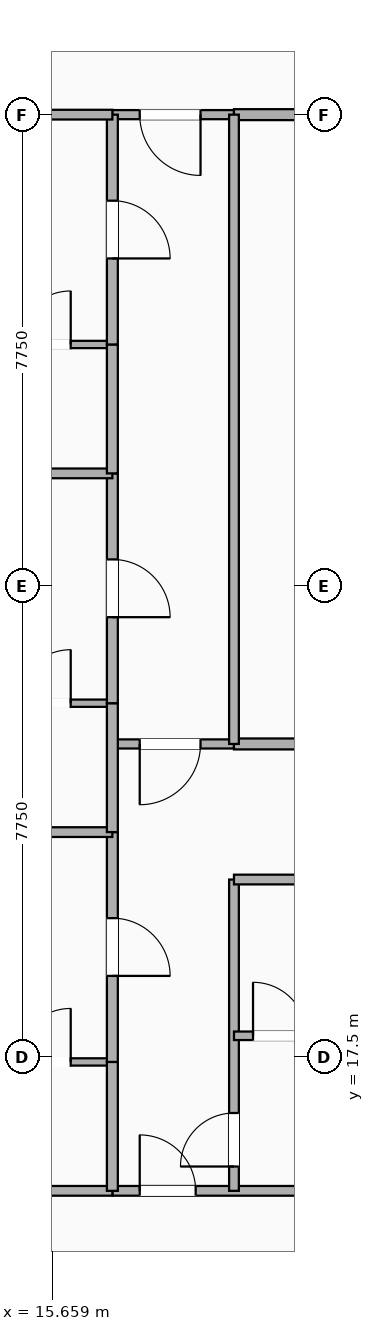
"""IFC4 building model, lengths in metres.
Left out: names, types, materials, properties, quantities, classifications, styles, units other than length and angle.
Written with IfcOpenShell. Run it as: python <this file> out.ifc"""

import sys

from ifc_helpers import new_model, si_unit, direction, frame, frame_2d, origin, place, context, subcontext, project, spatial, rectangle, extrude, element, fill, save


model = new_model("IFC4")
c1 = context("Model", 3, precision=1e-05, world=origin(), true_north=direction((0.0, 1.0)))
c2 = subcontext(c1, "Body", "Model", "MODEL_VIEW")
j1 = project(units=[si_unit("LENGTHUNIT", "METRE"), si_unit("PLANEANGLEUNIT", "RADIAN")], contexts=[c1])
p1 = place(None, origin())
s1 = spatial("IfcSite", under=j1, at=p1, CompositionType="ELEMENT")
p2 = place(p1, origin())
s2 = spatial("IfcBuilding", under=s1, at=p2, CompositionType="ELEMENT")
p3 = place(p2, frame((0.0, 0.0, 98.7)))
s3 = spatial("IfcBuildingStorey", under=s2, at=p3, CompositionType="ELEMENT", Elevation=98.7)
p4 = place(p3, frame((16.65, 15.3, 0.0), z_axis=(0.0, 0.0, 1.0), x_axis=(1.0, 0.0, 0.0)))
e1 = element("IfcWall", 1, at=p4, inside=s3, PredefinedType="PARTITIONING", context=c2, shape_type="SweptSolid", body=[
    extrude(rectangle(XDim=3.65, YDim=0.16, at=frame_2d((1.825, 0.0))), origin(), (0.0, 0.0, 1.0), 2.313),
])
p5 = place(p4, frame((1.37, 0.0, 0.0), z_axis=(0.0, 0.0, 1.0), x_axis=(-1.0, 0.0, 0.0)))
e2 = element("IfcOpeningElement", 2, at=p5, cuts=e1, PredefinedType="OPENING", context=c2, shape_type="SweptSolid", body=[
    extrude(rectangle(XDim=0.92, YDim=2.08, at=frame_2d((0.46, 1.04))), frame((0.0, 0.09, 0.0), z_axis=(0.0, -1.0, 0.0), x_axis=(1.0, 0.0, 0.0)), (0.0, 0.0, 1.0), 0.18),
])
p6 = place(p3, frame((18.65, 15.3, 0.0), z_axis=(0.0, 0.0, 1.0), x_axis=(0.0, 1.0, 0.0)))
e3 = element("IfcWall", 3, at=p6, inside=s3, PredefinedType="PARTITIONING", context=c2, shape_type="SweptSolid", body=[
    extrude(rectangle(XDim=5.12, YDim=0.16, at=frame_2d((2.56, 0.0))), origin(), (0.0, 0.0, 1.0), 2.313),
])
p7 = place(p6, frame((1.28, 0.0, 0.0), z_axis=(0.0, 0.0, 1.0), x_axis=(-1.0, 0.0, 0.0)))
e4 = element("IfcOpeningElement", 4, at=p7, cuts=e3, PredefinedType="OPENING", context=c2, shape_type="SweptSolid", body=[
    extrude(rectangle(XDim=0.88, YDim=2.08, at=frame_2d((0.44, 1.04))), frame((0.0, 0.09, 0.0), z_axis=(0.0, -1.0, 0.0), x_axis=(1.0, 0.0, 0.0)), (0.0, 0.0, 1.0), 0.18),
])
p8 = place(p3, frame((18.65, 20.42, 0.0), z_axis=(0.0, 0.0, 1.0), x_axis=(1.0, 0.0, 0.0)))
e5 = element("IfcWall", 5, at=p8, inside=s3, PredefinedType="PARTITIONING", context=c2, shape_type="SweptSolid", body=[
    extrude(rectangle(XDim=1.65, YDim=0.16, at=frame_2d((0.825, 0.0))), origin(), (0.0, 0.0, 1.0), 2.313),
])
p9 = place(p3, frame((16.65, 22.65, 0.0), z_axis=(0.0, 0.0, 1.0), x_axis=(1.0, 0.0, 0.0)))
e6 = element("IfcWall", 6, at=p9, inside=s3, PredefinedType="PARTITIONING", context=c2, shape_type="SweptSolid", body=[
    extrude(rectangle(XDim=2.0, YDim=0.15, at=frame_2d((1.0, 0.0))), origin(), (0.0, 0.0, 1.0), 3.24),
])
p10 = place(p9, frame((0.45, 0.0, 0.0)))
e7 = element("IfcOpeningElement", 7, at=p10, cuts=e6, PredefinedType="OPENING", context=c2, shape_type="SweptSolid", body=[
    extrude(rectangle(XDim=1.0, YDim=2.15, at=frame_2d((0.5, 1.075))), frame((0.0, 0.085, 0.0), z_axis=(0.0, -1.0, 0.0), x_axis=(1.0, 0.0, 0.0)), (0.0, 0.0, 1.0), 0.17),
])
p11 = place(p3, frame((16.65, 33.0, 0.0), z_axis=(0.0, 0.0, 1.0), x_axis=(1.0, 0.0, 0.0)))
e8 = element("IfcWall", 8, at=p11, inside=s3, PredefinedType="PARTITIONING", context=c2, shape_type="SweptSolid", body=[
    extrude(rectangle(XDim=2.0, YDim=0.15, at=frame_2d((1.0, 0.0))), origin(), (0.0, 0.0, 1.0), 2.313),
])
p12 = place(p11, frame((0.45, 0.0, 0.0)))
e9 = element("IfcOpeningElement", 9, at=p12, cuts=e8, PredefinedType="OPENING", context=c2, shape_type="SweptSolid", body=[
    extrude(rectangle(XDim=1.0, YDim=2.15, at=frame_2d((0.5, 1.075))), frame((0.0, 0.085, 0.0), z_axis=(0.0, -1.0, 0.0), x_axis=(1.0, 0.0, 0.0)), (0.0, 0.0, 1.0), 0.17),
])
p13 = place(p3, frame((18.65, 22.65, 0.0), z_axis=(0.0, 0.0, 1.0), x_axis=(1.0, 0.0, 0.0)))
e10 = element("IfcWall", 10, at=p13, inside=s3, PredefinedType="PARTITIONING", context=c2, shape_type="SweptSolid", body=[
    extrude(rectangle(XDim=14.75, YDim=0.18, at=frame_2d((7.375, 0.0))), origin(), (0.0, 0.0, 1.0), 2.313),
])
p14 = place(p13, frame((6.9, 0.0, 0.0)))
e11 = element("IfcOpeningElement", 11, at=p14, cuts=e10, PredefinedType="OPENING", context=c2, shape_type="SweptSolid", body=[
    extrude(rectangle(XDim=0.95, YDim=2.15, at=frame_2d((0.475, 1.075))), frame((0.0, 0.1, 0.0), z_axis=(0.0, -1.0, 0.0), x_axis=(1.0, 0.0, 0.0)), (0.0, 0.0, 1.0), 0.2),
])
p15 = place(p3, frame((18.65, 33.0, 0.0), z_axis=(0.0, 0.0, 1.0), x_axis=(1.0, 0.0, 0.0)))
e12 = element("IfcWall", 12, at=p15, inside=s3, PredefinedType="PARTITIONING", context=c2, shape_type="SweptSolid", body=[
    extrude(rectangle(XDim=14.75, YDim=0.18, at=frame_2d((7.375, 0.0))), origin(), (0.0, 0.0, 1.0), 2.313),
])
p16 = place(p3, frame((18.65, 22.65, 0.0), z_axis=(0.0, 0.0, 1.0), x_axis=(0.0, 1.0, 0.0)))
e13 = element("IfcWall", 13, at=p16, inside=s3, PredefinedType="PARTITIONING", context=c2, shape_type="SweptSolid", body=[
    extrude(rectangle(XDim=10.35, YDim=0.16, at=frame_2d((5.175, 0.0))), origin(), (0.0, 0.0, 1.0), 2.313),
])
p17 = place(p3, frame((11.47, 15.3, 0.0), z_axis=(0.0, 0.0, 1.0), x_axis=(1.0, 0.0, 0.0)))
e14 = element("IfcWall", 14, at=p17, inside=s3, PredefinedType="PARTITIONING", context=c2, shape_type="SweptSolid", body=[
    extrude(rectangle(XDim=5.18, YDim=0.16, at=frame_2d((2.59, 0.0))), origin(), (0.0, 0.0, 1.0), 2.603),
])
p18 = place(p3, frame((14.4, 17.42, 0.0), z_axis=(0.0, 0.0, 1.0), x_axis=(1.0, 0.0, 0.0)))
e15 = element("IfcWall", 15, at=p18, inside=s3, PredefinedType="PARTITIONING", context=c2, shape_type="SweptSolid", body=[
    extrude(rectangle(XDim=2.25, YDim=0.12, at=frame_2d((1.125, 0.0))), origin(), (0.0, 0.0, 1.0), 3.24),
])
p19 = place(p18, frame((1.565, 0.0, 0.0), z_axis=(0.0, 0.0, 1.0), x_axis=(-1.0, 0.0, 0.0)))
e16 = element("IfcOpeningElement", 16, at=p19, cuts=e15, PredefinedType="OPENING", context=c2, shape_type="SweptSolid", body=[
    extrude(rectangle(XDim=0.88, YDim=2.08, at=frame_2d((0.44, 1.04))), frame((0.0, 0.07, 0.0), z_axis=(0.0, -1.0, 0.0), x_axis=(1.0, 0.0, 0.0)), (0.0, 0.0, 1.0), 0.14),
])
p20 = place(p3, frame((16.65, 15.3, 0.0), z_axis=(0.0, 0.0, 1.0), x_axis=(0.0, 1.0, 0.0)))
e17 = element("IfcWall", 17, at=p20, inside=s3, PredefinedType="PARTITIONING", context=c2, shape_type="SweptSolid", body=[
    extrude(rectangle(XDim=2.12, YDim=0.18, at=frame_2d((1.06, 0.0))), origin(), (0.0, 0.0, 1.0), 2.922),
])
p21 = place(p3, frame((16.65, 17.42, 0.0), z_axis=(0.0, 0.0, 1.0), x_axis=(0.0, 1.0, 0.0)))
e18 = element("IfcWall", 18, at=p21, inside=s3, PredefinedType="PARTITIONING", context=c2, shape_type="SweptSolid", body=[
    extrude(rectangle(XDim=3.78, YDim=0.18, at=frame_2d((1.89, 0.0))), origin(), (0.0, 0.0, 1.0), 2.313),
])
p22 = place(p21, frame((1.415, 0.0, 0.0)))
e19 = element("IfcOpeningElement", 19, at=p22, cuts=e18, PredefinedType="OPENING", context=c2, shape_type="SweptSolid", body=[
    extrude(rectangle(XDim=0.95, YDim=2.15, at=frame_2d((0.475, 1.075))), frame((0.0, 0.1, 0.0), z_axis=(0.0, -1.0, 0.0), x_axis=(1.0, 0.0, 0.0)), (0.0, 0.0, 1.0), 0.2),
])
p23 = place(p3, frame((11.47, 21.2, 0.0), z_axis=(0.0, 0.0, 1.0), x_axis=(1.0, 0.0, 0.0)))
e20 = element("IfcWall", 20, at=p23, inside=s3, PredefinedType="PARTITIONING", context=c2, shape_type="SweptSolid", body=[
    extrude(rectangle(XDim=5.18, YDim=0.16, at=frame_2d((2.59, 0.0))), origin(), (0.0, 0.0, 1.0), 2.603),
])
p24 = place(p3, frame((14.4, 23.32, 0.0), z_axis=(0.0, 0.0, 1.0), x_axis=(1.0, 0.0, 0.0)))
e21 = element("IfcWall", 21, at=p24, inside=s3, PredefinedType="PARTITIONING", context=c2, shape_type="SweptSolid", body=[
    extrude(rectangle(XDim=2.25, YDim=0.12, at=frame_2d((1.125, 0.0))), origin(), (0.0, 0.0, 1.0), 3.24),
])
p25 = place(p24, frame((1.565, 0.0, 0.0), z_axis=(0.0, 0.0, 1.0), x_axis=(-1.0, 0.0, 0.0)))
e22 = element("IfcOpeningElement", 22, at=p25, cuts=e21, PredefinedType="OPENING", context=c2, shape_type="SweptSolid", body=[
    extrude(rectangle(XDim=0.88, YDim=2.08, at=frame_2d((0.44, 1.04))), frame((0.0, 0.07, 0.0), z_axis=(0.0, -1.0, 0.0), x_axis=(1.0, 0.0, 0.0)), (0.0, 0.0, 1.0), 0.14),
])
p26 = place(p3, frame((16.65, 21.2, 0.0), z_axis=(0.0, 0.0, 1.0), x_axis=(0.0, 1.0, 0.0)))
e23 = element("IfcWall", 23, at=p26, inside=s3, PredefinedType="PARTITIONING", context=c2, shape_type="SweptSolid", body=[
    extrude(rectangle(XDim=2.12, YDim=0.18, at=frame_2d((1.06, 0.0))), origin(), (0.0, 0.0, 1.0), 3.24),
])
p27 = place(p3, frame((16.65, 23.32, 0.0), z_axis=(0.0, 0.0, 1.0), x_axis=(0.0, 1.0, 0.0)))
e24 = element("IfcWall", 24, at=p27, inside=s3, PredefinedType="PARTITIONING", context=c2, shape_type="SweptSolid", body=[
    extrude(rectangle(XDim=3.78, YDim=0.18, at=frame_2d((1.89, 0.0))), origin(), (0.0, 0.0, 1.0), 2.818),
])
p28 = place(p27, frame((1.415, 0.0, 0.0)))
e25 = element("IfcOpeningElement", 25, at=p28, cuts=e24, PredefinedType="OPENING", context=c2, shape_type="SweptSolid", body=[
    extrude(rectangle(XDim=0.95, YDim=2.15, at=frame_2d((0.475, 1.075))), frame((0.0, 0.1, 0.0), z_axis=(0.0, -1.0, 0.0), x_axis=(1.0, 0.0, 0.0)), (0.0, 0.0, 1.0), 0.2),
])
p29 = place(p3, frame((11.47, 27.1, 0.0), z_axis=(0.0, 0.0, 1.0), x_axis=(1.0, 0.0, 0.0)))
e26 = element("IfcWall", 26, at=p29, inside=s3, PredefinedType="PARTITIONING", context=c2, shape_type="SweptSolid", body=[
    extrude(rectangle(XDim=5.18, YDim=0.16, at=frame_2d((2.59, 0.0))), origin(), (0.0, 0.0, 1.0), 2.603),
])
p30 = place(p3, frame((14.4, 29.22, 0.0), z_axis=(0.0, 0.0, 1.0), x_axis=(1.0, 0.0, 0.0)))
e27 = element("IfcWall", 27, at=p30, inside=s3, PredefinedType="PARTITIONING", context=c2, shape_type="SweptSolid", body=[
    extrude(rectangle(XDim=2.25, YDim=0.12, at=frame_2d((1.125, 0.0))), origin(), (0.0, 0.0, 1.0), 3.24),
])
p31 = place(p30, frame((1.565, 0.0, 0.0), z_axis=(0.0, 0.0, 1.0), x_axis=(-1.0, 0.0, 0.0)))
e28 = element("IfcOpeningElement", 28, at=p31, cuts=e27, PredefinedType="OPENING", context=c2, shape_type="SweptSolid", body=[
    extrude(rectangle(XDim=0.88, YDim=2.08, at=frame_2d((0.44, 1.04))), frame((0.0, 0.07, 0.0), z_axis=(0.0, -1.0, 0.0), x_axis=(1.0, 0.0, 0.0)), (0.0, 0.0, 1.0), 0.14),
])
p32 = place(p3, frame((16.65, 27.1, 0.0), z_axis=(0.0, 0.0, 1.0), x_axis=(0.0, 1.0, 0.0)))
e29 = element("IfcWall", 29, at=p32, inside=s3, PredefinedType="PARTITIONING", context=c2, shape_type="SweptSolid", body=[
    extrude(rectangle(XDim=2.12, YDim=0.18, at=frame_2d((1.06, 0.0))), origin(), (0.0, 0.0, 1.0), 2.818),
])
p33 = place(p3, frame((16.65, 29.22, 0.0), z_axis=(0.0, 0.0, 1.0), x_axis=(0.0, 1.0, 0.0)))
e30 = element("IfcWall", 30, at=p33, inside=s3, PredefinedType="PARTITIONING", context=c2, shape_type="SweptSolid", body=[
    extrude(rectangle(XDim=3.78, YDim=0.18, at=frame_2d((1.89, 0.0))), origin(), (0.0, 0.0, 1.0), 2.313),
])
p34 = place(p33, frame((1.415, 0.0, 0.0)))
e31 = element("IfcOpeningElement", 31, at=p34, cuts=e30, PredefinedType="OPENING", context=c2, shape_type="SweptSolid", body=[
    extrude(rectangle(XDim=0.95, YDim=2.15, at=frame_2d((0.475, 1.075))), frame((0.0, 0.1, 0.0), z_axis=(0.0, -1.0, 0.0), x_axis=(1.0, 0.0, 0.0)), (0.0, 0.0, 1.0), 0.2),
])
p35 = place(p3, frame((11.47, 33.0, 0.0), z_axis=(0.0, 0.0, 1.0), x_axis=(1.0, 0.0, 0.0)))
e32 = element("IfcWall", 32, at=p35, inside=s3, PredefinedType="PARTITIONING", context=c2, shape_type="SweptSolid", body=[
    extrude(rectangle(XDim=5.18, YDim=0.16, at=frame_2d((2.59, 0.0))), origin(), (0.0, 0.0, 1.0), 2.313),
])
p36 = place(p3, frame((18.65, 17.85, 0.0), z_axis=(0.0, 0.0, 1.0), x_axis=(1.0, 0.0, 0.0)))
e33 = element("IfcWall", 33, at=p36, inside=s3, PredefinedType="PARTITIONING", context=c2, shape_type="SweptSolid", body=[
    extrude(rectangle(XDim=1.6, YDim=0.14, at=frame_2d((0.8, 0.0))), origin(), (0.0, 0.0, 1.0), 2.313),
])
p37 = place(p36, frame((1.193, 0.0, 0.0), z_axis=(0.0, 0.0, 1.0), x_axis=(-1.0, 0.0, 0.0)))
e34 = element("IfcOpeningElement", 34, at=p37, cuts=e33, PredefinedType="OPENING", context=c2, shape_type="SweptSolid", body=[
    extrude(rectangle(XDim=0.88, YDim=2.08, at=frame_2d((0.44, 1.04))), frame((0.0, 0.08, 0.0), z_axis=(0.0, -1.0, 0.0), x_axis=(1.0, 0.0, 0.0)), (0.0, 0.0, 1.0), 0.16),
])
p38 = place(p5, origin())
e35 = element("IfcDoor", 35, at=p38, inside=s3, OperationType="SINGLE_SWING_LEFT", PredefinedType="DOOR", context=c2, shape_type="SweptSolid", body=[
    extrude(rectangle(XDim=0.92, YDim=2.08, at=frame_2d((0.46, 1.04))), frame((0.0, 0.025, 0.0), z_axis=(0.0, -1.0, 0.0), x_axis=(1.0, 0.0, 0.0)), (0.0, 0.0, 1.0), 0.05),
])
fill(e2, e35)
p39 = place(p7, origin())
e36 = element("IfcDoor", 36, at=p39, inside=s3, OperationType="SINGLE_SWING_LEFT", PredefinedType="DOOR", context=c2, shape_type="SweptSolid", body=[
    extrude(rectangle(XDim=0.88, YDim=2.08, at=frame_2d((0.44, 1.04))), frame((0.0, 0.025, 0.0), z_axis=(0.0, -1.0, 0.0), x_axis=(1.0, 0.0, 0.0)), (0.0, 0.0, 1.0), 0.05),
])
fill(e4, e36)
p40 = place(p10, origin())
e37 = element("IfcDoor", 37, at=p40, inside=s3, OperationType="SINGLE_SWING_LEFT", PredefinedType="DOOR", context=c2, shape_type="SweptSolid", body=[
    extrude(rectangle(XDim=1.0, YDim=2.15, at=frame_2d((0.5, 1.075))), frame((0.0, 0.025, 0.0), z_axis=(0.0, -1.0, 0.0), x_axis=(1.0, 0.0, 0.0)), (0.0, 0.0, 1.0), 0.05),
])
fill(e7, e37)
p41 = place(p12, origin())
e38 = element("IfcDoor", 38, at=p41, inside=s3, OperationType="SINGLE_SWING_RIGHT", PredefinedType="DOOR", context=c2, shape_type="SweptSolid", body=[
    extrude(rectangle(XDim=1.0, YDim=2.15, at=frame_2d((0.5, 1.075))), frame((0.0, 0.025, 0.0), z_axis=(0.0, -1.0, 0.0), x_axis=(1.0, 0.0, 0.0)), (0.0, 0.0, 1.0), 0.05),
])
fill(e9, e38)
p42 = place(p19, origin())
e39 = element("IfcDoor", 39, at=p42, inside=s3, OperationType="SINGLE_SWING_RIGHT", PredefinedType="DOOR", context=c2, shape_type="SweptSolid", body=[
    extrude(rectangle(XDim=0.88, YDim=2.08, at=frame_2d((0.44, 1.04))), frame((0.0, 0.025, 0.0), z_axis=(0.0, -1.0, 0.0), x_axis=(1.0, 0.0, 0.0)), (0.0, 0.0, 1.0), 0.05),
])
fill(e16, e39)
p43 = place(p22, origin())
e40 = element("IfcDoor", 40, at=p43, inside=s3, OperationType="SINGLE_SWING_LEFT", PredefinedType="DOOR", context=c2, shape_type="SweptSolid", body=[
    extrude(rectangle(XDim=0.95, YDim=2.15, at=frame_2d((0.475, 1.075))), frame((0.0, 0.025, 0.0), z_axis=(0.0, -1.0, 0.0), x_axis=(1.0, 0.0, 0.0)), (0.0, 0.0, 1.0), 0.05),
])
fill(e19, e40)
p44 = place(p25, origin())
e41 = element("IfcDoor", 41, at=p44, inside=s3, OperationType="SINGLE_SWING_RIGHT", PredefinedType="DOOR", context=c2, shape_type="SweptSolid", body=[
    extrude(rectangle(XDim=0.88, YDim=2.08, at=frame_2d((0.44, 1.04))), frame((0.0, 0.025, 0.0), z_axis=(0.0, -1.0, 0.0), x_axis=(1.0, 0.0, 0.0)), (0.0, 0.0, 1.0), 0.05),
])
fill(e22, e41)
p45 = place(p28, origin())
e42 = element("IfcDoor", 42, at=p45, inside=s3, OperationType="SINGLE_SWING_LEFT", PredefinedType="DOOR", context=c2, shape_type="SweptSolid", body=[
    extrude(rectangle(XDim=0.95, YDim=2.15, at=frame_2d((0.475, 1.075))), frame((0.0, 0.025, 0.0), z_axis=(0.0, -1.0, 0.0), x_axis=(1.0, 0.0, 0.0)), (0.0, 0.0, 1.0), 0.05),
])
fill(e25, e42)
p46 = place(p31, origin())
e43 = element("IfcDoor", 43, at=p46, inside=s3, OperationType="SINGLE_SWING_RIGHT", PredefinedType="DOOR", context=c2, shape_type="SweptSolid", body=[
    extrude(rectangle(XDim=0.88, YDim=2.08, at=frame_2d((0.44, 1.04))), frame((0.0, 0.025, 0.0), z_axis=(0.0, -1.0, 0.0), x_axis=(1.0, 0.0, 0.0)), (0.0, 0.0, 1.0), 0.05),
])
fill(e28, e43)
p47 = place(p34, origin())
e44 = element("IfcDoor", 44, at=p47, inside=s3, OperationType="SINGLE_SWING_LEFT", PredefinedType="DOOR", context=c2, shape_type="SweptSolid", body=[
    extrude(rectangle(XDim=0.95, YDim=2.15, at=frame_2d((0.475, 1.075))), frame((0.0, 0.025, 0.0), z_axis=(0.0, -1.0, 0.0), x_axis=(1.0, 0.0, 0.0)), (0.0, 0.0, 1.0), 0.05),
])
fill(e31, e44)
p48 = place(p37, origin())
e45 = element("IfcDoor", 45, at=p48, inside=s3, OperationType="SINGLE_SWING_LEFT", PredefinedType="DOOR", context=c2, shape_type="SweptSolid", body=[
    extrude(rectangle(XDim=0.88, YDim=2.08, at=frame_2d((0.44, 1.04))), frame((0.0, 0.025, 0.0), z_axis=(0.0, -1.0, 0.0), x_axis=(1.0, 0.0, 0.0)), (0.0, 0.0, 1.0), 0.05),
])
fill(e34, e45)
save(model, sys.argv[1])
